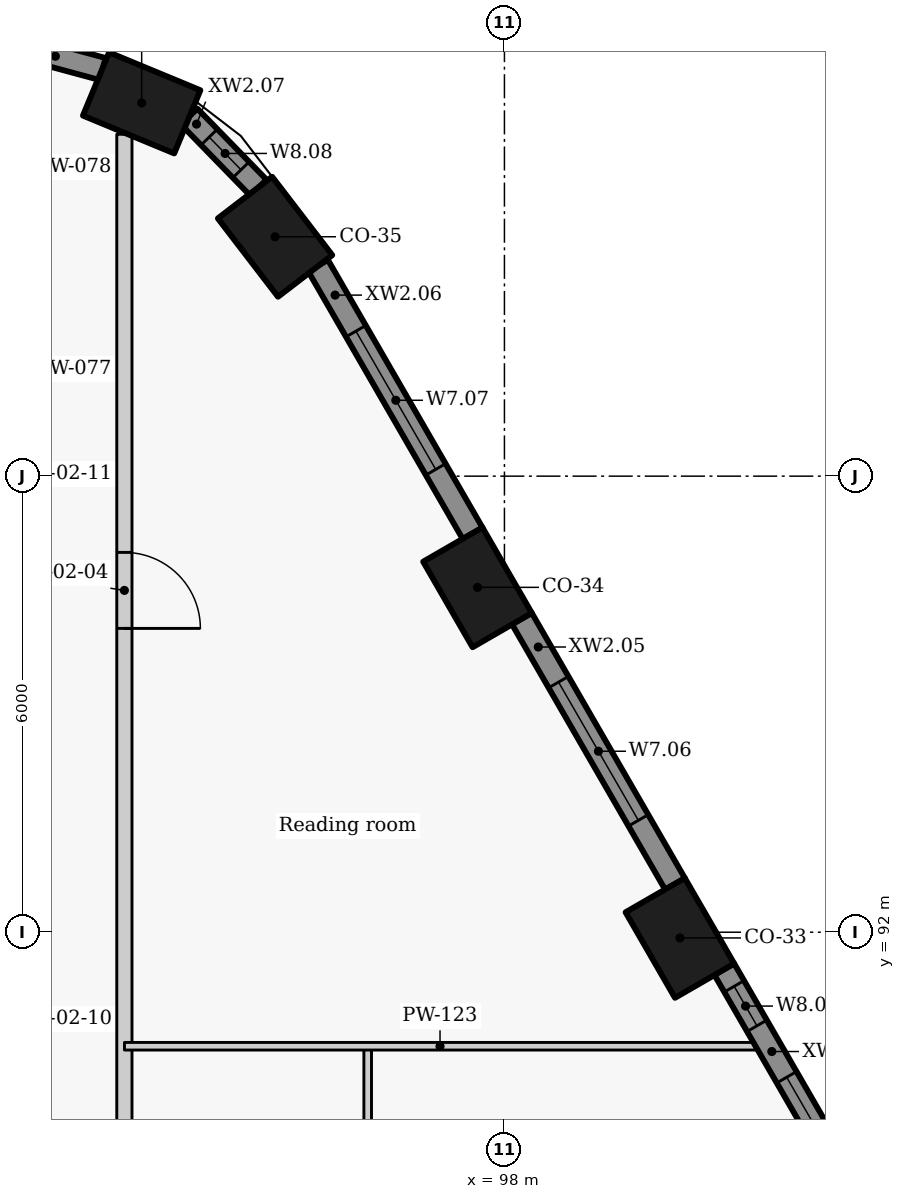
"""IFC4 building model, lengths in metres.
Left out: names, types, materials, properties, quantities, classifications, styles, units other than length and angle.
Written with IfcOpenShell. Run it as: python <this file> out.ifc"""

import sys

from ifc_helpers import new_model, si_unit, direction, frame, frame_2d, origin, origin_2d, place, context, subcontext, project, spatial, rectangle, extrude, element, fill, save


model = new_model("IFC4")
c1 = context("Model", 3, precision=1e-05, world=origin(), true_north=direction((0.0, 1.0)))
c2 = subcontext(c1, "Body", "Model", "MODEL_VIEW")
j1 = project(units=[si_unit("LENGTHUNIT", "METRE"), si_unit("PLANEANGLEUNIT", "RADIAN")], contexts=[c1])
p1 = place(None, origin())
s1 = spatial("IfcSite", under=j1, at=p1, CompositionType="ELEMENT")
p2 = place(p1, origin())
s2 = spatial("IfcBuilding", under=s1, at=p2, CompositionType="ELEMENT")
p3 = place(p2, frame((0.0, 0.0, 140.4)))
s3 = spatial("IfcBuildingStorey", under=s2, at=p3, CompositionType="ELEMENT", Elevation=140.4)
for number, where, z_axis, x_axis in (
    (1, (100.308, 91.925, 0.0), (0.0, 0.0, 1.0), (-0.5, 0.866, 0.0)),
    (2, (97.646, 96.537, 0.0), (0.0, 0.0, 1.0), (-0.5, 0.866, 0.0)),
    (3, (94.982, 101.149, 0.0), (0.0, 0.0, 1.0), (-0.609, 0.793, 0.0)),
    (4, (93.227, 102.91, 0.0), (0.0, 0.0, 1.0), (-0.924, 0.383, 0.0)),
):
    element("IfcColumn", number, at=place(p3, frame(where, z_axis=z_axis, x_axis=x_axis)), inside=s3, PredefinedType="COLUMN", context=c2, shape_type="SweptSolid", body=[
        extrude(rectangle(XDim=1.3, YDim=0.9, at=origin_2d()), origin(), (0.0, 0.0, 1.0), 3.3),
    ])
p4 = place(p3, frame((102.76, 88.279, 0.0), z_axis=(0.0, 0.0, 1.0), x_axis=(-0.499933594891, 0.866063739398, 0.0)))
e5 = element("IfcWall", 5, at=p4, inside=s3, PredefinedType="SOLIDWALL", context=c2, shape_type="SweptSolid", body=[
    extrude(rectangle(XDim=3.737, YDim=0.3, at=frame_2d((1.868, 0.0))), origin(), (0.0, 0.0, 1.0), 2.425),
])
p5 = place(p4, frame((0.593, 0.0, 0.9)))
e6 = element("IfcOpeningElement", 6, at=p5, cuts=e5, PredefinedType="OPENING", context=c2, shape_type="SweptSolid", body=[
    extrude(rectangle(XDim=1.5, YDim=1.1, at=frame_2d((0.75, 0.55))), frame((0.0, 0.16, 0.0), z_axis=(0.0, -1.0, 0.0), x_axis=(1.0, 0.0, 0.0)), (0.0, 0.0, 1.0), 0.32),
])
p6 = place(p4, frame((2.875, 0.0, 0.9)))
e7 = element("IfcOpeningElement", 7, at=p6, cuts=e5, PredefinedType="OPENING", context=c2, shape_type="SweptSolid", body=[
    extrude(rectangle(XDim=0.6, YDim=1.1, at=frame_2d((0.3, 0.55))), frame((0.0, 0.16, 0.0), z_axis=(0.0, -1.0, 0.0), x_axis=(1.0, 0.0, 0.0)), (0.0, 0.0, 1.0), 0.32),
])
p7 = place(p3, frame((100.245, 92.634, 0.0), z_axis=(0.0, 0.0, 1.0), x_axis=(-0.500031546601, 0.86600718958, 0.0)))
e8 = element("IfcWall", 8, at=p7, inside=s3, PredefinedType="SOLIDWALL", context=c2, shape_type="SweptSolid", body=[
    extrude(rectangle(XDim=4.034, YDim=0.3, at=frame_2d((2.017, 0.0))), origin(), (0.0, 0.0, 1.0), 2.425),
])
p8 = place(p7, frame((0.967, 0.0, 0.9)))
e9 = element("IfcOpeningElement", 9, at=p8, cuts=e8, PredefinedType="OPENING", context=c2, shape_type="SweptSolid", body=[
    extrude(rectangle(XDim=2.1, YDim=1.1, at=frame_2d((1.05, 0.55))), frame((0.0, 0.16, 0.0), z_axis=(0.0, -1.0, 0.0), x_axis=(1.0, 0.0, 0.0)), (0.0, 0.0, 1.0), 0.32),
])
p9 = place(p3, frame((97.582, 97.247, 0.0), z_axis=(0.0, 0.0, 1.0), x_axis=(-0.500018589245, 0.866014671013, 0.0)))
e10 = element("IfcWall", 10, at=p9, inside=s3, PredefinedType="SOLIDWALL", context=c2, shape_type="SweptSolid", body=[
    extrude(rectangle(XDim=4.068, YDim=0.3, at=frame_2d((2.034, 0.0))), origin(), (0.0, 0.0, 1.0), 2.425),
])
p10 = place(p9, frame((0.973, 0.0, 0.9)))
e11 = element("IfcOpeningElement", 11, at=p10, cuts=e10, PredefinedType="OPENING", context=c2, shape_type="SweptSolid", body=[
    extrude(rectangle(XDim=2.1, YDim=1.1, at=frame_2d((1.05, 0.55))), frame((0.0, 0.16, 0.0), z_axis=(0.0, -1.0, 0.0), x_axis=(1.0, 0.0, 0.0)), (0.0, 0.0, 1.0), 0.32),
])
p11 = place(p3, frame((94.763, 101.795, 0.0), z_axis=(0.0, 0.0, 1.0), x_axis=(-0.697598997785, 0.716488407645, 0.0)))
e12 = element("IfcWall", 12, at=p11, inside=s3, PredefinedType="SOLIDWALL", context=c2, shape_type="SweptSolid", body=[
    extrude(rectangle(XDim=1.305, YDim=0.3, at=frame_2d((0.653, 0.0))), origin(), (0.0, 0.0, 1.0), 2.425),
])
p12 = place(p11, frame((0.328, 0.0, 0.9)))
e13 = element("IfcOpeningElement", 13, at=p12, cuts=e12, PredefinedType="OPENING", context=c2, shape_type="SweptSolid", body=[
    extrude(rectangle(XDim=0.6, YDim=1.1, at=frame_2d((0.3, 0.55))), frame((0.0, 0.16, 0.0), z_axis=(0.0, -1.0, 0.0), x_axis=(1.0, 0.0, 0.0)), (0.0, 0.0, 1.0), 0.32),
])
p13 = place(p3, frame((92.713, 103.356, 0.0), z_axis=(0.0, 0.0, 1.0), x_axis=(-0.965274225809, 0.26123872031, 0.0)))
e14 = element("IfcWall", 14, at=p13, inside=s3, PredefinedType="SOLIDWALL", context=c2, shape_type="SweptSolid", body=[
    extrude(rectangle(XDim=1.287, YDim=0.3, at=frame_2d((0.644, 0.0))), origin(), (0.0, 0.0, 1.0), 2.425),
])
p14 = place(p3, frame((93.0, 102.498, 0.0), z_axis=(0.0, 0.0, 1.0), x_axis=(0.0, -1.0, 0.0)))
e15 = element("IfcWall", 15, at=p14, inside=s3, PredefinedType="PARTITIONING", context=c2, shape_type="SweptSolid", body=[
    extrude(rectangle(XDim=45.665, YDim=0.2, at=frame_2d((22.833, 0.0))), origin(), (0.0, 0.0, 1.0), 2.405),
])
p15 = place(p14, frame((35.831, 0.0, 0.0)))
e16 = element("IfcOpeningElement", 16, at=p15, cuts=e15, PredefinedType="OPENING", context=c2, shape_type="SweptSolid", body=[
    extrude(rectangle(XDim=1.0, YDim=2.1, at=frame_2d((0.5, 1.05))), frame((0.0, 0.11, 0.0), z_axis=(0.0, -1.0, 0.0), x_axis=(1.0, 0.0, 0.0)), (0.0, 0.0, 1.0), 0.22),
])
p16 = place(p14, frame((25.723, 0.0, 0.0)))
e17 = element("IfcOpeningElement", 17, at=p16, cuts=e15, PredefinedType="OPENING", context=c2, shape_type="SweptSolid", body=[
    extrude(rectangle(XDim=1.0, YDim=2.1, at=frame_2d((0.5, 1.05))), frame((0.0, 0.11, 0.0), z_axis=(0.0, -1.0, 0.0), x_axis=(1.0, 0.0, 0.0)), (0.0, 0.0, 1.0), 0.22),
])
p17 = place(p14, frame((5.501, 0.0, 0.0)))
e18 = element("IfcOpeningElement", 18, at=p17, cuts=e15, PredefinedType="OPENING", context=c2, shape_type="SweptSolid", body=[
    extrude(rectangle(XDim=1.0, YDim=2.1, at=frame_2d((0.5, 1.05))), frame((0.0, 0.11, 0.0), z_axis=(0.0, -1.0, 0.0), x_axis=(1.0, 0.0, 0.0)), (0.0, 0.0, 1.0), 0.22),
])
p18 = place(p3, frame((96.201, 87.314, 0.0), z_axis=(0.0, 0.0, 1.0), x_axis=(0.0, 1.0, 0.0)))
e19 = element("IfcWall", 19, at=p18, inside=s3, PredefinedType="PARTITIONING", context=c2, shape_type="SweptSolid", body=[
    extrude(rectangle(XDim=3.186, YDim=0.1, at=frame_2d((1.593, 0.0))), origin(), (0.0, 0.0, 1.0), 3.025),
])
p19 = place(p3, frame((93.001, 90.5, 0.0), z_axis=(0.0, 0.0, 1.0), x_axis=(1.0, 0.0, 0.0)))
e20 = element("IfcWall", 20, at=p19, inside=s3, PredefinedType="PARTITIONING", context=c2, shape_type="SweptSolid", body=[
    extrude(rectangle(XDim=8.303, YDim=0.1, at=frame_2d((4.151, 0.0))), origin(), (0.0, 0.0, 1.0), 2.405),
])
p20 = place(p5, origin())
e21 = element("IfcWindow", 21, at=p20, inside=s3, PartitioningType="SINGLE_PANEL", PredefinedType="WINDOW", context=c2, shape_type="SweptSolid", body=[
    extrude(rectangle(XDim=1.5, YDim=1.1, at=frame_2d((0.75, 0.55))), frame((0.0, 0.03, 0.0), z_axis=(0.0, -1.0, 0.0), x_axis=(1.0, 0.0, 0.0)), (0.0, 0.0, 1.0), 0.06),
])
fill(e6, e21)
p21 = place(p6, origin())
e22 = element("IfcWindow", 22, at=p21, inside=s3, PartitioningType="SINGLE_PANEL", PredefinedType="WINDOW", context=c2, shape_type="SweptSolid", body=[
    extrude(rectangle(XDim=0.6, YDim=1.1, at=frame_2d((0.3, 0.55))), frame((0.0, 0.03, 0.0), z_axis=(0.0, -1.0, 0.0), x_axis=(1.0, 0.0, 0.0)), (0.0, 0.0, 1.0), 0.06),
])
fill(e7, e22)
p22 = place(p8, origin())
e23 = element("IfcWindow", 23, at=p22, inside=s3, PartitioningType="SINGLE_PANEL", PredefinedType="WINDOW", context=c2, shape_type="SweptSolid", body=[
    extrude(rectangle(XDim=2.1, YDim=1.1, at=frame_2d((1.05, 0.55))), frame((0.0, 0.03, 0.0), z_axis=(0.0, -1.0, 0.0), x_axis=(1.0, 0.0, 0.0)), (0.0, 0.0, 1.0), 0.06),
])
fill(e9, e23)
p23 = place(p10, origin())
e24 = element("IfcWindow", 24, at=p23, inside=s3, PartitioningType="SINGLE_PANEL", PredefinedType="WINDOW", context=c2, shape_type="SweptSolid", body=[
    extrude(rectangle(XDim=2.1, YDim=1.1, at=frame_2d((1.05, 0.55))), frame((0.0, 0.03, 0.0), z_axis=(0.0, -1.0, 0.0), x_axis=(1.0, 0.0, 0.0)), (0.0, 0.0, 1.0), 0.06),
])
fill(e11, e24)
p24 = place(p12, origin())
e25 = element("IfcWindow", 25, at=p24, inside=s3, PartitioningType="SINGLE_PANEL", PredefinedType="WINDOW", context=c2, shape_type="SweptSolid", body=[
    extrude(rectangle(XDim=0.6, YDim=1.1, at=frame_2d((0.3, 0.55))), frame((0.0, 0.03, 0.0), z_axis=(0.0, -1.0, 0.0), x_axis=(1.0, 0.0, 0.0)), (0.0, 0.0, 1.0), 0.06),
])
fill(e13, e25)
p25 = place(p17, origin())
e26 = element("IfcDoor", 26, at=p25, inside=s3, OperationType="SINGLE_SWING_RIGHT", PredefinedType="DOOR", context=c2, shape_type="SweptSolid", body=[
    extrude(rectangle(XDim=1.0, YDim=2.1, at=frame_2d((0.5, 1.05))), frame((0.0, 0.025, 0.0), z_axis=(0.0, -1.0, 0.0), x_axis=(1.0, 0.0, 0.0)), (0.0, 0.0, 1.0), 0.05),
])
fill(e18, e26)
save(model, sys.argv[1])
